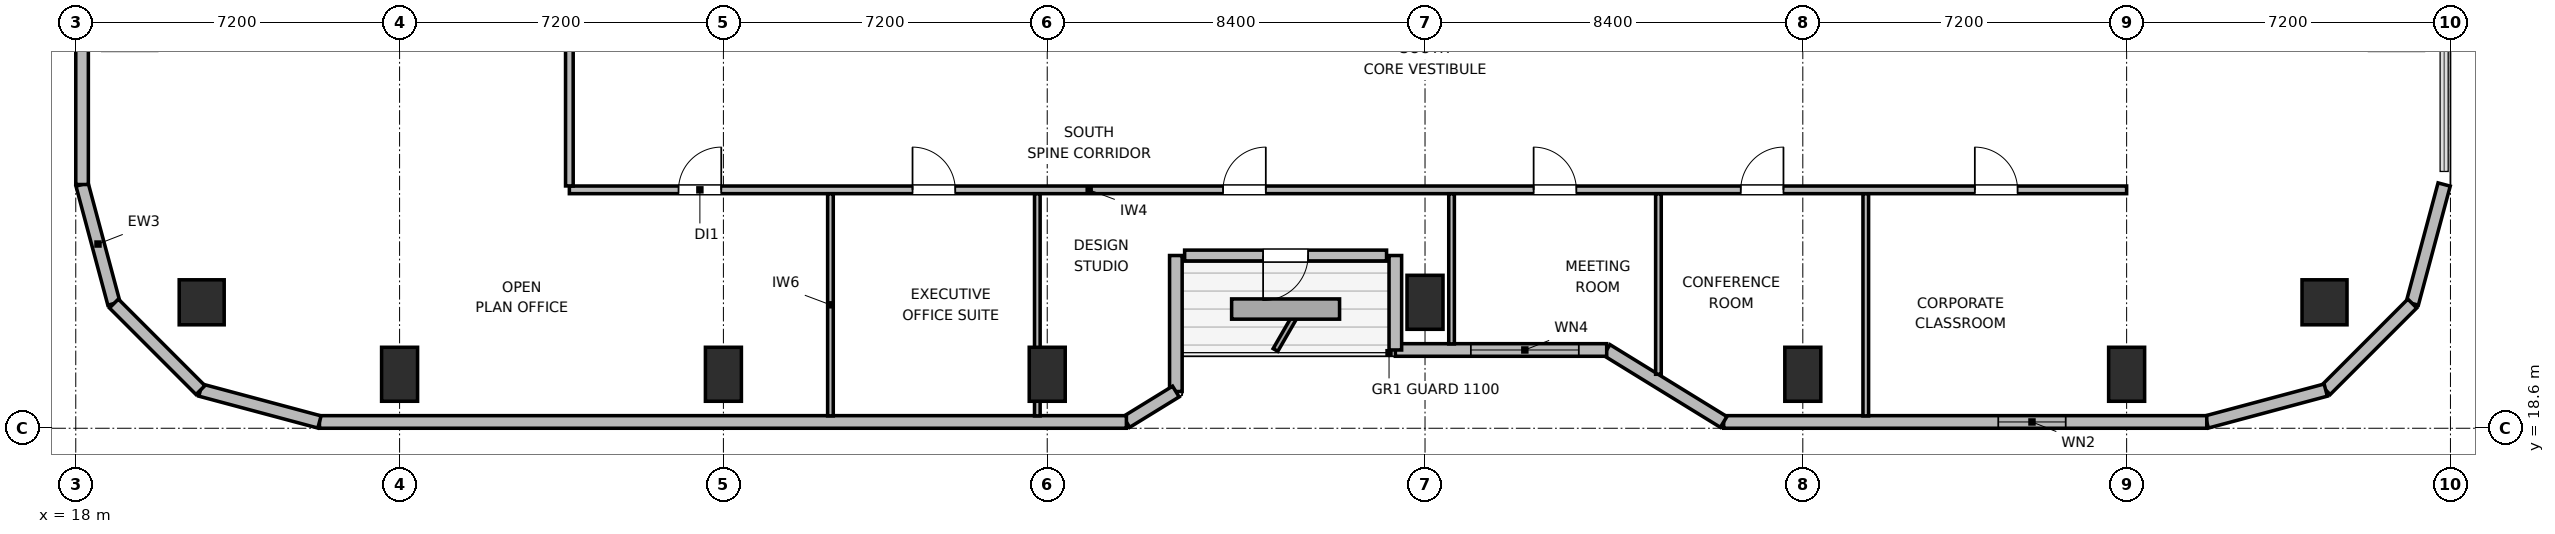
"""IFC4 building model, lengths in metres.
Left out: names, types, materials, properties, quantities, classifications, styles, units other than length and angle.
Written with IfcOpenShell. Run it as: python <this file> out.ifc"""

import sys

from ifc_helpers import new_model, si_unit, direction, frame, frame_2d, origin, origin_2d, place, context, subcontext, project, spatial, rectangle, circle, extrude, element, fill, save


model = new_model("IFC4")
c1 = context("Model", 3, precision=1e-05, world=origin(), true_north=direction((0.0, 1.0)))
c2 = subcontext(c1, "Body", "Model", "MODEL_VIEW")
j1 = project(units=[si_unit("LENGTHUNIT", "METRE"), si_unit("PLANEANGLEUNIT", "RADIAN")], contexts=[c1])
p1 = place(None, origin())
s1 = spatial("IfcSite", under=j1, at=p1, CompositionType="ELEMENT")
p2 = place(p1, origin())
s2 = spatial("IfcBuilding", under=s1, at=p2, CompositionType="ELEMENT")
p3 = place(p2, frame((0.0, 0.0, 205.8)))
s3 = spatial("IfcBuildingStorey", under=s2, at=p3, CompositionType="ELEMENT", Elevation=205.8)
for number, where, z_axis, x_axis in (
    (1, (20.8, 21.4, 0.0), (0.0, 0.0, 1.0), (1.0, 0.0, 0.0)),
    (2, (68.0, 21.4, 0.0), (0.0, 0.0, 1.0), (1.0, 0.0, 0.0)),
):
    element("IfcColumn", number, at=place(p3, frame(where, z_axis=z_axis, x_axis=x_axis)), inside=s3, PredefinedType="COLUMN", context=c2, shape_type="SweptSolid", body=[
        extrude(circle(Radius=0.5, at=origin_2d()), origin(), (0.0, 0.0, 1.0), 3.9),
    ])
for number, where, z_axis, x_axis in (
    (3, (25.2, 19.8, 0.0), (0.0, 0.0, 1.0), (1.0, 0.0, 0.0)),
    (4, (32.4, 19.8, 0.0), (0.0, 0.0, 1.0), (1.0, 0.0, 0.0)),
    (5, (39.6, 19.8, 0.0), (0.0, 0.0, 1.0), (1.0, 0.0, 0.0)),
    (6, (48.0, 21.4, 0.0), (0.0, 0.0, 1.0), (1.0, 0.0, 0.0)),
    (7, (56.4, 19.8, 0.0), (0.0, 0.0, 1.0), (1.0, 0.0, 0.0)),
    (8, (63.6, 19.8, 0.0), (0.0, 0.0, 1.0), (1.0, 0.0, 0.0)),
):
    element("IfcColumn", number, at=place(p3, frame(where, z_axis=z_axis, x_axis=x_axis)), inside=s3, PredefinedType="COLUMN", context=c2, shape_type="SweptSolid", body=[
        extrude(rectangle(XDim=0.8, YDim=1.2, at=origin_2d()), origin(), (0.0, 0.0, 1.0), 3.9),
    ])
p4 = place(p3, frame((18.848, 21.373, 0.0), z_axis=(0.0, 0.0, 1.0), x_axis=(-0.258672222976, 0.9659651552, 0.0)))
e9 = element("IfcWall", 9, at=p4, inside=s3, PredefinedType="SOLIDWALL", context=c2, shape_type="SweptSolid", body=[
    extrude(rectangle(XDim=2.739, YDim=0.28, at=frame_2d((1.37, 0.0))), origin(), (0.0, 0.0, 1.0), 3.6),
])
p5 = place(p3, frame((18.14, 24.018, 0.0), z_axis=(0.0, 0.0, 1.0), x_axis=(0.0, 1.0, 0.0)))
e10 = element("IfcWall", 10, at=p5, inside=s3, PredefinedType="SOLIDWALL", context=c2, shape_type="SweptSolid", body=[
    extrude(rectangle(XDim=5.242, YDim=0.28, at=frame_2d((2.621, 0.0))), origin(), (0.0, 0.0, 1.0), 3.6),
])
p6 = place(p3, frame((70.66, 24.018, 0.0), z_axis=(0.0, 0.0, 1.0), x_axis=(-0.258672222976, -0.9659651552, 0.0)))
e11 = element("IfcWall", 11, at=p6, inside=s3, PredefinedType="SOLIDWALL", context=c2, shape_type="SweptSolid", body=[
    extrude(rectangle(XDim=2.739, YDim=0.28, at=frame_2d((1.37, 0.0))), origin(), (0.0, 0.0, 1.0), 3.6),
])
p7 = place(p3, frame((69.951, 21.373, 0.0), z_axis=(0.0, 0.0, 1.0), x_axis=(-0.707061915429, -0.707151644098, 0.0)))
e12 = element("IfcWall", 12, at=p7, inside=s3, PredefinedType="SOLIDWALL", context=c2, shape_type="SweptSolid", body=[
    extrude(rectangle(XDim=2.721, YDim=0.28, at=frame_2d((1.36, 0.0))), origin(), (0.0, 0.0, 1.0), 3.6),
])
p8 = place(p3, frame((68.028, 19.448, 0.0), z_axis=(0.0, 0.0, 1.0), x_axis=(-0.965971118627, -0.258649952598, 0.0)))
e13 = element("IfcWall", 13, at=p8, inside=s3, PredefinedType="SOLIDWALL", context=c2, shape_type="SweptSolid", body=[
    extrude(rectangle(XDim=2.739, YDim=0.28, at=frame_2d((1.37, 0.0))), origin(), (0.0, 0.0, 1.0), 3.6),
])
p9 = place(p3, frame((65.382, 18.74, 0.0), z_axis=(0.0, 0.0, 1.0), x_axis=(-1.0, 0.0, 0.0)))
e14 = element("IfcWall", 14, at=p9, inside=s3, PredefinedType="SOLIDWALL", context=c2, shape_type="SweptSolid", body=[
    extrude(rectangle(XDim=10.742, YDim=0.28, at=frame_2d((5.371, 0.0))), origin(), (0.0, 0.0, 1.0), 3.6),
])
p10 = place(p9, frame((3.136, 0.0, 0.85)))
e15 = element("IfcOpeningElement", 15, at=p10, cuts=e14, PredefinedType="OPENING", context=c2, shape_type="SweptSolid", body=[
    extrude(rectangle(XDim=1.5, YDim=1.1, at=frame_2d((0.75, 0.55))), frame((0.0, 0.15, 0.0), z_axis=(0.0, -1.0, 0.0), x_axis=(1.0, 0.0, 0.0)), (0.0, 0.0, 1.0), 0.3),
])
p11 = place(p3, frame((54.64, 18.74, 0.0), z_axis=(0.0, 0.0, 1.0), x_axis=(-0.851652825334, 0.524106349037, 0.0)))
e16 = element("IfcWall", 16, at=p11, inside=s3, PredefinedType="SOLIDWALL", context=c2, shape_type="SweptSolid", body=[
    extrude(rectangle(XDim=3.053, YDim=0.28, at=frame_2d((1.526, 0.0))), origin(), (0.0, 0.0, 1.0), 2.135),
])
p12 = place(p3, frame((52.04, 20.34, 0.0), z_axis=(0.0, 0.0, 1.0), x_axis=(-1.0, 0.0, 0.0)))
e17 = element("IfcWall", 17, at=p12, inside=s3, PredefinedType="SOLIDWALL", context=c2, shape_type="SweptSolid", body=[
    extrude(rectangle(XDim=4.699, YDim=0.28, at=frame_2d((2.35, 0.0))), origin(), (0.0, 0.0, 1.0), 2.135),
])
p13 = place(p12, frame((0.62, 0.0, 0.85)))
e18 = element("IfcOpeningElement", 18, at=p13, cuts=e17, PredefinedType="OPENING", context=c2, shape_type="SweptSolid", body=[
    extrude(rectangle(XDim=2.4, YDim=1.15, at=frame_2d((1.2, 0.575))), frame((0.0, 0.15, 0.0), z_axis=(0.0, -1.0, 0.0), x_axis=(1.0, 0.0, 0.0)), (0.0, 0.0, 1.0), 0.3),
])
p14 = place(p3, frame((47.34, 20.34, 0.0), z_axis=(0.0, 0.0, 1.0), x_axis=(0.0, 1.0, 0.0)))
e19 = element("IfcWall", 19, at=p14, inside=s3, PredefinedType="SOLIDWALL", context=c2, shape_type="SweptSolid", body=[
    extrude(rectangle(XDim=2.1, YDim=0.28, at=frame_2d((1.05, 0.0))), origin(), (0.0, 0.0, 1.0), 2.135),
])
p15 = place(p3, frame((47.145, 22.44, 0.0), z_axis=(0.0, 0.0, 1.0), x_axis=(-1.0, 0.0, 0.0)))
e20 = element("IfcWall", 20, at=p15, inside=s3, PredefinedType="SOLIDWALL", context=c2, shape_type="SweptSolid", body=[
    extrude(rectangle(XDim=4.49, YDim=0.24, at=frame_2d((2.245, 0.0))), origin(), (0.0, 0.0, 1.0), 2.185),
])
p16 = place(p15, frame((1.745, 0.0, 0.0)))
e21 = element("IfcOpeningElement", 21, at=p16, cuts=e20, PredefinedType="OPENING", context=c2, shape_type="SweptSolid", body=[
    extrude(rectangle(XDim=1.0, YDim=2.02, at=frame_2d((0.5, 1.01))), frame((0.0, 0.13, 0.0), z_axis=(0.0, -1.0, 0.0), x_axis=(1.0, 0.0, 0.0)), (0.0, 0.0, 1.0), 0.26),
])
p17 = place(p3, frame((42.46, 22.44, 0.0), z_axis=(0.0, 0.0, 1.0), x_axis=(0.0, -1.0, 0.0)))
e22 = element("IfcWall", 22, at=p17, inside=s3, PredefinedType="SOLIDWALL", context=c2, shape_type="SweptSolid", body=[
    extrude(rectangle(XDim=3.024, YDim=0.28, at=frame_2d((1.512, 0.0))), origin(), (0.0, 0.0, 1.0), 2.135),
])
p18 = place(p3, frame((42.46, 19.416, 0.0), z_axis=(0.0, 0.0, 1.0), x_axis=(-0.851801140441, -0.523865266212, 0.0)))
e23 = element("IfcWall", 23, at=p18, inside=s3, PredefinedType="SOLIDWALL", context=c2, shape_type="SweptSolid", body=[
    extrude(rectangle(XDim=1.291, YDim=0.28, at=frame_2d((0.646, 0.0))), origin(), (0.0, 0.0, 1.0), 3.6),
])
p19 = place(p3, frame((41.36, 18.74, 0.0), z_axis=(0.0, 0.0, 1.0), x_axis=(-1.0, 0.0, 0.0)))
e24 = element("IfcWall", 24, at=p19, inside=s3, PredefinedType="SOLIDWALL", context=c2, shape_type="SweptSolid", body=[
    extrude(rectangle(XDim=17.942, YDim=0.28, at=frame_2d((8.971, 0.0))), origin(), (0.0, 0.0, 1.0), 3.6),
])
p20 = place(p3, frame((23.418, 18.74, 0.0), z_axis=(0.0, 0.0, 1.0), x_axis=(-0.965971118627, 0.258649952598, 0.0)))
e25 = element("IfcWall", 25, at=p20, inside=s3, PredefinedType="SOLIDWALL", context=c2, shape_type="SweptSolid", body=[
    extrude(rectangle(XDim=2.739, YDim=0.28, at=frame_2d((1.37, 0.0))), origin(), (0.0, 0.0, 1.0), 3.6),
])
p21 = place(p3, frame((20.772, 19.448, 0.0), z_axis=(0.0, 0.0, 1.0), x_axis=(-0.707106781187, 0.707106781187, 0.0)))
e26 = element("IfcWall", 26, at=p21, inside=s3, PredefinedType="SOLIDWALL", context=c2, shape_type="SweptSolid", body=[
    extrude(rectangle(XDim=2.721, YDim=0.28, at=frame_2d((1.36, 0.0))), origin(), (0.0, 0.0, 1.0), 3.6),
])
p22 = place(p3, frame((28.975, 23.9, 0.0), z_axis=(0.0, 0.0, 1.0), x_axis=(1.0, 0.0, 0.0)))
e27 = element("IfcWall", 27, at=p22, inside=s3, PredefinedType="PARTITIONING", context=c2, shape_type="SweptSolid", body=[
    extrude(rectangle(XDim=34.625, YDim=0.17, at=frame_2d((17.312, 0.0))), origin(), (0.0, 0.0, 1.0), 3.6),
])
p23 = place(p22, frame((2.427, 0.0, 0.0)))
e28 = element("IfcOpeningElement", 28, at=p23, cuts=e27, PredefinedType="OPENING", context=c2, shape_type="SweptSolid", body=[
    extrude(rectangle(XDim=0.95, YDim=2.04, at=frame_2d((0.475, 1.02))), frame((0.0, 0.095, 0.0), z_axis=(0.0, -1.0, 0.0), x_axis=(1.0, 0.0, 0.0)), (0.0, 0.0, 1.0), 0.19),
])
p24 = place(p22, frame((7.63, 0.0, 0.0)))
e29 = element("IfcOpeningElement", 29, at=p24, cuts=e27, PredefinedType="OPENING", context=c2, shape_type="SweptSolid", body=[
    extrude(rectangle(XDim=0.95, YDim=2.04, at=frame_2d((0.475, 1.02))), frame((0.0, 0.095, 0.0), z_axis=(0.0, -1.0, 0.0), x_axis=(1.0, 0.0, 0.0)), (0.0, 0.0, 1.0), 0.19),
])
p25 = place(p22, frame((14.535, 0.0, 0.0)))
e30 = element("IfcOpeningElement", 30, at=p25, cuts=e27, PredefinedType="OPENING", context=c2, shape_type="SweptSolid", body=[
    extrude(rectangle(XDim=0.95, YDim=2.04, at=frame_2d((0.475, 1.02))), frame((0.0, 0.095, 0.0), z_axis=(0.0, -1.0, 0.0), x_axis=(1.0, 0.0, 0.0)), (0.0, 0.0, 1.0), 0.19),
])
p26 = place(p22, frame((21.44, 0.0, 0.0)))
e31 = element("IfcOpeningElement", 31, at=p26, cuts=e27, PredefinedType="OPENING", context=c2, shape_type="SweptSolid", body=[
    extrude(rectangle(XDim=0.95, YDim=2.04, at=frame_2d((0.475, 1.02))), frame((0.0, 0.095, 0.0), z_axis=(0.0, -1.0, 0.0), x_axis=(1.0, 0.0, 0.0)), (0.0, 0.0, 1.0), 0.19),
])
p27 = place(p22, frame((26.045, 0.0, 0.0)))
e32 = element("IfcOpeningElement", 32, at=p27, cuts=e27, PredefinedType="OPENING", context=c2, shape_type="SweptSolid", body=[
    extrude(rectangle(XDim=0.95, YDim=2.04, at=frame_2d((0.475, 1.02))), frame((0.0, 0.095, 0.0), z_axis=(0.0, -1.0, 0.0), x_axis=(1.0, 0.0, 0.0)), (0.0, 0.0, 1.0), 0.19),
])
p28 = place(p22, frame((31.25, 0.0, 0.0)))
e33 = element("IfcOpeningElement", 33, at=p28, cuts=e27, PredefinedType="OPENING", context=c2, shape_type="SweptSolid", body=[
    extrude(rectangle(XDim=0.95, YDim=2.04, at=frame_2d((0.475, 1.02))), frame((0.0, 0.095, 0.0), z_axis=(0.0, -1.0, 0.0), x_axis=(1.0, 0.0, 0.0)), (0.0, 0.0, 1.0), 0.19),
])
p29 = place(p3, frame((28.975, 23.987, 0.0), z_axis=(0.0, 0.0, 1.0), x_axis=(0.0, 1.0, 0.0)))
e34 = element("IfcWall", 34, at=p29, inside=s3, PredefinedType="PARTITIONING", context=c2, shape_type="SweptSolid", body=[
    extrude(rectangle(XDim=10.413, YDim=0.17, at=frame_2d((5.207, 0.0))), origin(), (0.0, 0.0, 1.0), 3.6),
])
p30 = place(p29, frame((4.688, 0.0, 0.0)))
e35 = element("IfcOpeningElement", 35, at=p30, cuts=e34, PredefinedType="OPENING", context=c2, shape_type="SweptSolid", body=[
    extrude(rectangle(XDim=0.95, YDim=2.04, at=frame_2d((0.475, 1.02))), frame((0.0, 0.095, 0.0), z_axis=(0.0, -1.0, 0.0), x_axis=(1.0, 0.0, 0.0)), (0.0, 0.0, 1.0), 0.19),
])
p31 = place(p3, frame((34.78, 18.875, 0.0), z_axis=(0.0, 0.0, 1.0), x_axis=(0.0, 1.0, 0.0)))
e36 = element("IfcWall", 36, at=p31, inside=s3, PredefinedType="PARTITIONING", context=c2, shape_type="SweptSolid", body=[
    extrude(rectangle(XDim=4.938, YDim=0.125, at=frame_2d((2.469, 0.0))), origin(), (0.0, 0.0, 1.0), 3.6),
])
p32 = place(p3, frame((39.38, 18.875, 0.0), z_axis=(0.0, 0.0, 1.0), x_axis=(0.0, 1.0, 0.0)))
e37 = element("IfcWall", 37, at=p32, inside=s3, PredefinedType="PARTITIONING", context=c2, shape_type="SweptSolid", body=[
    extrude(rectangle(XDim=4.938, YDim=0.125, at=frame_2d((2.469, 0.0))), origin(), (0.0, 0.0, 1.0), 2.185),
])
p33 = place(p3, frame((48.59, 20.475, 0.0), z_axis=(0.0, 0.0, 1.0), x_axis=(0.0, 1.0, 0.0)))
e38 = element("IfcWall", 38, at=p33, inside=s3, PredefinedType="PARTITIONING", context=c2, shape_type="SweptSolid", body=[
    extrude(rectangle(XDim=3.338, YDim=0.125, at=frame_2d((1.669, 0.0))), origin(), (0.0, 0.0, 1.0), 3.6),
])
p34 = place(p3, frame((53.19, 19.8, 0.0), z_axis=(0.0, 0.0, 1.0), x_axis=(0.0, 1.0, 0.0)))
e39 = element("IfcWall", 39, at=p34, inside=s3, PredefinedType="PARTITIONING", context=c2, shape_type="SweptSolid", body=[
    extrude(rectangle(XDim=4.013, YDim=0.125, at=frame_2d((2.006, 0.0))), origin(), (0.0, 0.0, 1.0), 2.963),
])
p35 = place(p3, frame((57.8, 18.875, 0.0), z_axis=(0.0, 0.0, 1.0), x_axis=(0.0, 1.0, 0.0)))
e40 = element("IfcWall", 40, at=p35, inside=s3, PredefinedType="PARTITIONING", context=c2, shape_type="SweptSolid", body=[
    extrude(rectangle(XDim=4.938, YDim=0.125, at=frame_2d((2.469, 0.0))), origin(), (0.0, 0.0, 1.0), 3.6),
])
p36 = place(p10, origin())
e41 = element("IfcWindow", 41, at=p36, inside=s3, PartitioningType="SINGLE_PANEL", PredefinedType="WINDOW", context=c2, shape_type="SweptSolid", body=[
    extrude(rectangle(XDim=1.5, YDim=1.1, at=frame_2d((0.75, 0.55))), frame((0.0, 0.03, 0.0), z_axis=(0.0, -1.0, 0.0), x_axis=(1.0, 0.0, 0.0)), (0.0, 0.0, 1.0), 0.06),
])
fill(e15, e41)
p37 = place(p13, origin())
e42 = element("IfcWindow", 42, at=p37, inside=s3, PartitioningType="SINGLE_PANEL", PredefinedType="WINDOW", context=c2, shape_type="SweptSolid", body=[
    extrude(rectangle(XDim=2.4, YDim=1.15, at=frame_2d((1.2, 0.575))), frame((0.0, 0.03, 0.0), z_axis=(0.0, -1.0, 0.0), x_axis=(1.0, 0.0, 0.0)), (0.0, 0.0, 1.0), 0.06),
])
fill(e18, e42)
p38 = place(p16, origin())
e43 = element("IfcDoor", 43, at=p38, inside=s3, OperationType="SINGLE_SWING_RIGHT", PredefinedType="DOOR", context=c2, shape_type="SweptSolid", body=[
    extrude(rectangle(XDim=1.0, YDim=2.02, at=frame_2d((0.5, 1.01))), frame((0.0, 0.025, 0.0), z_axis=(0.0, -1.0, 0.0), x_axis=(1.0, 0.0, 0.0)), (0.0, 0.0, 1.0), 0.05),
])
fill(e21, e43)
p39 = place(p23, origin())
e44 = element("IfcDoor", 44, at=p39, inside=s3, OperationType="SINGLE_SWING_RIGHT", PredefinedType="DOOR", context=c2, shape_type="SweptSolid", body=[
    extrude(rectangle(XDim=0.95, YDim=2.04, at=frame_2d((0.475, 1.02))), frame((0.0, 0.025, 0.0), z_axis=(0.0, -1.0, 0.0), x_axis=(1.0, 0.0, 0.0)), (0.0, 0.0, 1.0), 0.05),
])
fill(e28, e44)
p40 = place(p24, origin())
e45 = element("IfcDoor", 45, at=p40, inside=s3, OperationType="SINGLE_SWING_LEFT", PredefinedType="DOOR", context=c2, shape_type="SweptSolid", body=[
    extrude(rectangle(XDim=0.95, YDim=2.04, at=frame_2d((0.475, 1.02))), frame((0.0, 0.025, 0.0), z_axis=(0.0, -1.0, 0.0), x_axis=(1.0, 0.0, 0.0)), (0.0, 0.0, 1.0), 0.05),
])
fill(e29, e45)
p41 = place(p25, origin())
e46 = element("IfcDoor", 46, at=p41, inside=s3, OperationType="SINGLE_SWING_RIGHT", PredefinedType="DOOR", context=c2, shape_type="SweptSolid", body=[
    extrude(rectangle(XDim=0.95, YDim=2.04, at=frame_2d((0.475, 1.02))), frame((0.0, 0.025, 0.0), z_axis=(0.0, -1.0, 0.0), x_axis=(1.0, 0.0, 0.0)), (0.0, 0.0, 1.0), 0.05),
])
fill(e30, e46)
p42 = place(p26, origin())
e47 = element("IfcDoor", 47, at=p42, inside=s3, OperationType="SINGLE_SWING_LEFT", PredefinedType="DOOR", context=c2, shape_type="SweptSolid", body=[
    extrude(rectangle(XDim=0.95, YDim=2.04, at=frame_2d((0.475, 1.02))), frame((0.0, 0.025, 0.0), z_axis=(0.0, -1.0, 0.0), x_axis=(1.0, 0.0, 0.0)), (0.0, 0.0, 1.0), 0.05),
])
fill(e31, e47)
p43 = place(p27, origin())
e48 = element("IfcDoor", 48, at=p43, inside=s3, OperationType="SINGLE_SWING_RIGHT", PredefinedType="DOOR", context=c2, shape_type="SweptSolid", body=[
    extrude(rectangle(XDim=0.95, YDim=2.04, at=frame_2d((0.475, 1.02))), frame((0.0, 0.025, 0.0), z_axis=(0.0, -1.0, 0.0), x_axis=(1.0, 0.0, 0.0)), (0.0, 0.0, 1.0), 0.05),
])
fill(e32, e48)
p44 = place(p28, origin())
e49 = element("IfcDoor", 49, at=p44, inside=s3, OperationType="SINGLE_SWING_LEFT", PredefinedType="DOOR", context=c2, shape_type="SweptSolid", body=[
    extrude(rectangle(XDim=0.95, YDim=2.04, at=frame_2d((0.475, 1.02))), frame((0.0, 0.025, 0.0), z_axis=(0.0, -1.0, 0.0), x_axis=(1.0, 0.0, 0.0)), (0.0, 0.0, 1.0), 0.05),
])
fill(e33, e49)
save(model, sys.argv[1])
